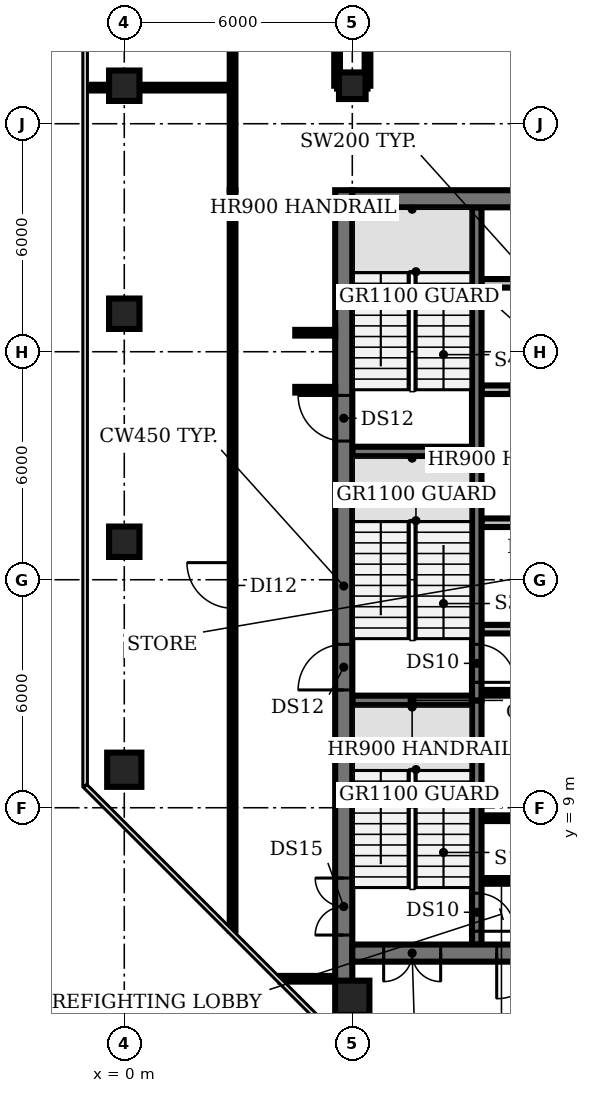
"""IFC4 building model, lengths in metres.
Left out: names, types, materials, properties, quantities, classifications, styles, units other than length and angle.
Written with IfcOpenShell. Run it as: python <this file> out.ifc"""

import sys

from ifc_helpers import new_model, si_unit, direction, frame, frame_2d, origin, origin_2d, place, context, subcontext, project, spatial, rectangle, circle, extrude, element, fill, save


model = new_model("IFC4")
c1 = context("Model", 3, precision=1e-05, world=origin(), true_north=direction((0.0, 1.0)))
c2 = subcontext(c1, "Body", "Model", "MODEL_VIEW")
j1 = project(units=[si_unit("LENGTHUNIT", "METRE"), si_unit("PLANEANGLEUNIT", "RADIAN")], contexts=[c1])
p1 = place(None, origin())
s1 = spatial("IfcSite", under=j1, at=p1, CompositionType="ELEMENT")
p2 = place(p1, origin())
s2 = spatial("IfcBuilding", under=s1, at=p2, CompositionType="ELEMENT")
p3 = place(p2, frame((0.0, 0.0, 226.4)))
s3 = spatial("IfcBuildingStorey", under=s2, at=p3, CompositionType="ELEMENT", Elevation=226.4)
p4 = place(p3, frame((0.0, 10.0, 0.0), z_axis=(0.0, 0.0, 1.0), x_axis=(1.0, 0.0, 0.0)))
e1 = element("IfcColumn", 1, at=p4, inside=s3, PredefinedType="COLUMN", context=c2, shape_type="SweptSolid", body=[
    extrude(circle(Radius=0.45, at=origin_2d()), origin(), (0.0, 0.0, 1.0), 3.85),
])
for number, where, z_axis, x_axis in (
    (2, (0.0, 16.0, 0.0), (0.0, 0.0, 1.0), (1.0, 0.0, 0.0)),
    (3, (0.0, 22.0, 0.0), (0.0, 0.0, 1.0), (1.0, 0.0, 0.0)),
    (4, (0.0, 28.0, 0.0), (0.0, 0.0, 1.0), (1.0, 0.0, 0.0)),
):
    element("IfcColumn", number, at=place(p3, frame(where, z_axis=z_axis, x_axis=x_axis)), inside=s3, PredefinedType="COLUMN", context=c2, shape_type="SweptSolid", body=[
        extrude(rectangle(XDim=0.8, YDim=0.8, at=origin_2d()), origin(), (0.0, 0.0, 1.0), 3.85),
    ])
p5 = place(p3, frame((6.0, 4.0, 0.0), z_axis=(0.0, 0.0, 1.0), x_axis=(1.0, 0.0, 0.0)))
e5 = element("IfcColumn", 5, at=p5, inside=s3, PredefinedType="COLUMN", context=c2, shape_type="SweptSolid", body=[
    extrude(circle(Radius=0.45, at=origin_2d()), origin(), (0.0, 0.0, 1.0), 3.85),
])
p6 = place(p3, frame((6.0, 28.0, 0.0), z_axis=(0.0, 0.0, 1.0), x_axis=(1.0, 0.0, 0.0)))
e6 = element("IfcColumn", 6, at=p6, inside=s3, PredefinedType="COLUMN", context=c2, shape_type="SweptSolid", body=[
    extrude(rectangle(XDim=0.7, YDim=0.7, at=origin_2d()), origin(), (0.0, 0.0, 1.0), 3.85),
])
for number, where, z_axis, x_axis in (
    (7, (9.4, 7.075, 0.0), (0.0, 0.0, 1.0), (1.0, 0.0, 0.0)),
    (8, (9.4, 8.725, 0.0), (0.0, 0.0, 1.0), (1.0, 0.0, 0.0)),
    (9, (9.4, 10.375, 0.0), (0.0, 0.0, 1.0), (1.0, 0.0, 0.0)),
):
    element("IfcWall", number, at=place(p3, frame(where, z_axis=z_axis, x_axis=x_axis)), inside=s3, PredefinedType="SHEAR", context=c2, shape_type="SweptSolid", body=[
        extrude(rectangle(XDim=1.05, YDim=0.15, at=frame_2d((0.525, 0.0))), origin(), (0.0, 0.0, 1.0), 3.85),
    ])
p7 = place(p3, frame((6.0, 11.825, 0.0), z_axis=(0.0, 0.0, 1.0), x_axis=(1.0, 0.0, 0.0)))
e10 = element("IfcWall", 10, at=p7, inside=s3, PredefinedType="SHEAR", context=c2, shape_type="SweptSolid", body=[
    extrude(rectangle(XDim=3.15, YDim=0.25, at=frame_2d((1.575, 0.0))), origin(), (0.0, 0.0, 1.0), 3.85),
])
p8 = place(p3, frame((9.4, 12.025, 0.0), z_axis=(0.0, 0.0, 1.0), x_axis=(1.0, 0.0, 0.0)))
e11 = element("IfcWall", 11, at=p8, inside=s3, PredefinedType="SHEAR", context=c2, shape_type="SweptSolid", body=[
    extrude(rectangle(XDim=1.05, YDim=0.15, at=frame_2d((0.525, 0.0))), origin(), (0.0, 0.0, 1.0), 3.85),
])
p9 = place(p3, frame((9.4, 13.7, 0.0), z_axis=(0.0, 0.0, 1.0), x_axis=(1.0, 0.0, 0.0)))
e12 = element("IfcWall", 12, at=p9, inside=s3, PredefinedType="PARTITIONING", context=c2, shape_type="SweptSolid", body=[
    extrude(rectangle(XDim=4.0, YDim=0.225, at=frame_2d((2.0, 0.0))), origin(), (0.0, 0.0, 1.0), 3.85),
])
p10 = place(p3, frame((9.4, 16.5, 0.0), z_axis=(0.0, 0.0, 1.0), x_axis=(1.0, 0.0, 0.0)))
e13 = element("IfcWall", 13, at=p10, inside=s3, PredefinedType="PARTITIONING", context=c2, shape_type="SweptSolid", body=[
    extrude(rectangle(XDim=14.6, YDim=0.225, at=frame_2d((7.3, 0.0))), origin(), (0.0, 0.0, 1.0), 3.85),
])
p11 = place(p10, frame((0.85, 0.0, 0.0)))
e14 = element("IfcOpeningElement", 14, at=p11, cuts=e13, PredefinedType="OPENING", context=c2, shape_type="SweptSolid", body=[
    extrude(rectangle(XDim=0.9, YDim=2.1, at=frame_2d((0.45, 1.05))), frame((0.0, 0.123, 0.0), z_axis=(0.0, -1.0, 0.0), x_axis=(1.0, 0.0, 0.0)), (0.0, 0.0, 1.0), 0.245),
])
p12 = place(p10, frame((3.625, 0.0, 0.0)))
e15 = element("IfcOpeningElement", 15, at=p12, cuts=e13, PredefinedType="OPENING", context=c2, shape_type="SweptSolid", body=[
    extrude(rectangle(XDim=0.9, YDim=2.1, at=frame_2d((0.45, 1.05))), frame((0.0, 0.123, 0.0), z_axis=(0.0, -1.0, 0.0), x_axis=(1.0, 0.0, 0.0)), (0.0, 0.0, 1.0), 0.245),
])
p13 = place(p10, frame((7.775, 0.0, 0.0)))
e16 = element("IfcOpeningElement", 16, at=p13, cuts=e13, PredefinedType="OPENING", context=c2, shape_type="SweptSolid", body=[
    extrude(rectangle(XDim=1.0, YDim=2.1, at=frame_2d((0.5, 1.05))), frame((0.0, 0.123, 0.0), z_axis=(0.0, -1.0, 0.0), x_axis=(1.0, 0.0, 0.0)), (0.0, 0.0, 1.0), 0.245),
])
p14 = place(p10, frame((12.4, 0.0, 0.0)))
e17 = element("IfcOpeningElement", 17, at=p14, cuts=e13, PredefinedType="OPENING", context=c2, shape_type="SweptSolid", body=[
    extrude(rectangle(XDim=1.0, YDim=2.1, at=frame_2d((0.5, 1.05))), frame((0.0, 0.123, 0.0), z_axis=(0.0, -1.0, 0.0), x_axis=(1.0, 0.0, 0.0)), (0.0, 0.0, 1.0), 0.245),
])
p15 = place(p3, frame((6.0, 18.375, 0.0), z_axis=(0.0, 0.0, 1.0), x_axis=(1.0, 0.0, 0.0)))
e18 = element("IfcWall", 18, at=p15, inside=s3, PredefinedType="SHEAR", context=c2, shape_type="SweptSolid", body=[
    extrude(rectangle(XDim=3.15, YDim=0.25, at=frame_2d((1.575, 0.0))), origin(), (0.0, 0.0, 1.0), 3.85),
])
p16 = place(p3, frame((24.0, 20.0, 0.0), z_axis=(0.0, 0.0, 1.0), x_axis=(-1.0, 0.0, 0.0)))
e19 = element("IfcWall", 19, at=p16, inside=s3, PredefinedType="PARTITIONING", context=c2, shape_type="SweptSolid", body=[
    extrude(rectangle(XDim=14.6, YDim=0.225, at=frame_2d((7.3, 0.0))), origin(), (0.0, 0.0, 1.0), 3.85),
])
p17 = place(p16, frame((12.75, 0.0, 0.0)))
e20 = element("IfcOpeningElement", 20, at=p17, cuts=e19, PredefinedType="OPENING", context=c2, shape_type="SweptSolid", body=[
    extrude(rectangle(XDim=1.1, YDim=2.1, at=frame_2d((0.55, 1.05))), frame((0.0, 0.123, 0.0), z_axis=(0.0, -1.0, 0.0), x_axis=(1.0, 0.0, 0.0)), (0.0, 0.0, 1.0), 0.245),
])
p18 = place(p16, frame((9.95, 0.0, 0.0)))
e21 = element("IfcOpeningElement", 21, at=p18, cuts=e19, PredefinedType="OPENING", context=c2, shape_type="SweptSolid", body=[
    extrude(rectangle(XDim=1.1, YDim=2.1, at=frame_2d((0.55, 1.05))), frame((0.0, 0.123, 0.0), z_axis=(0.0, -1.0, 0.0), x_axis=(1.0, 0.0, 0.0)), (0.0, 0.0, 1.0), 0.245),
])
p19 = place(p16, frame((7.15, 0.0, 0.0)))
e22 = element("IfcOpeningElement", 22, at=p19, cuts=e19, PredefinedType="OPENING", context=c2, shape_type="SweptSolid", body=[
    extrude(rectangle(XDim=1.1, YDim=2.1, at=frame_2d((0.55, 1.05))), frame((0.0, 0.123, 0.0), z_axis=(0.0, -1.0, 0.0), x_axis=(1.0, 0.0, 0.0)), (0.0, 0.0, 1.0), 0.245),
])
p20 = place(p16, frame((4.35, 0.0, 0.0)))
e23 = element("IfcOpeningElement", 23, at=p20, cuts=e19, PredefinedType="OPENING", context=c2, shape_type="SweptSolid", body=[
    extrude(rectangle(XDim=1.1, YDim=2.1, at=frame_2d((0.55, 1.05))), frame((0.0, 0.123, 0.0), z_axis=(0.0, -1.0, 0.0), x_axis=(1.0, 0.0, 0.0)), (0.0, 0.0, 1.0), 0.245),
])
p21 = place(p16, frame((1.2, 0.0, 0.0)))
e24 = element("IfcOpeningElement", 24, at=p21, cuts=e19, PredefinedType="OPENING", context=c2, shape_type="SweptSolid", body=[
    extrude(rectangle(XDim=1.0, YDim=2.1, at=frame_2d((0.5, 1.05))), frame((0.0, 0.123, 0.0), z_axis=(0.0, -1.0, 0.0), x_axis=(1.0, 0.0, 0.0)), (0.0, 0.0, 1.0), 0.245),
])
p22 = place(p3, frame((9.4, 22.8, 0.0), z_axis=(0.0, 0.0, 1.0), x_axis=(1.0, 0.0, 0.0)))
e25 = element("IfcWall", 25, at=p22, inside=s3, PredefinedType="PARTITIONING", context=c2, shape_type="SweptSolid", body=[
    extrude(rectangle(XDim=14.6, YDim=0.225, at=frame_2d((7.3, 0.0))), origin(), (0.0, 0.0, 1.0), 3.85),
])
p23 = place(p3, frame((9.275, 11.825, 0.0), z_axis=(0.0, 0.0, 1.0), x_axis=(0.0, -1.0, 0.0)))
e26 = element("IfcWall", 26, at=p23, inside=s3, PredefinedType="SHEAR", context=c2, shape_type="SweptSolid", body=[
    extrude(rectangle(XDim=6.425, YDim=0.25, at=frame_2d((3.212, 0.0))), origin(), (0.0, 0.0, 1.0), 3.85),
])
p24 = place(p23, frame((5.075, 0.0, 0.0)))
e27 = element("IfcOpeningElement", 27, at=p24, cuts=e26, PredefinedType="OPENING", context=c2, shape_type="SweptSolid", body=[
    extrude(rectangle(XDim=1.0, YDim=2.1, at=frame_2d((0.5, 1.05))), frame((0.0, 0.135, 0.0), z_axis=(0.0, -1.0, 0.0), x_axis=(1.0, 0.0, 0.0)), (0.0, 0.0, 1.0), 0.27),
])
p25 = place(p3, frame((9.275, 18.375, 0.0), z_axis=(0.0, 0.0, 1.0), x_axis=(0.0, -1.0, 0.0)))
e28 = element("IfcWall", 28, at=p25, inside=s3, PredefinedType="SHEAR", context=c2, shape_type="SweptSolid", body=[
    extrude(rectangle(XDim=6.55, YDim=0.25, at=frame_2d((3.275, 0.0))), origin(), (0.0, 0.0, 1.0), 3.85),
])
p26 = place(p25, frame((5.075, 0.0, 0.0)))
e29 = element("IfcOpeningElement", 29, at=p26, cuts=e28, PredefinedType="OPENING", context=c2, shape_type="SweptSolid", body=[
    extrude(rectangle(XDim=1.0, YDim=2.1, at=frame_2d((0.5, 1.05))), frame((0.0, 0.135, 0.0), z_axis=(0.0, -1.0, 0.0), x_axis=(1.0, 0.0, 0.0)), (0.0, 0.0, 1.0), 0.27),
])
p27 = place(p3, frame((9.275, 18.375, 0.0), z_axis=(0.0, 0.0, 1.0), x_axis=(0.0, 1.0, 0.0)))
e30 = element("IfcWall", 30, at=p27, inside=s3, PredefinedType="SHEAR", context=c2, shape_type="SweptSolid", body=[
    extrude(rectangle(XDim=6.425, YDim=0.25, at=frame_2d((3.212, 0.0))), origin(), (0.0, 0.0, 1.0), 3.85),
])
p28 = place(p3, frame((5.775, 4.42, 0.0), z_axis=(0.0, 0.0, 1.0), x_axis=(0.0, 1.0, 0.0)))
e31 = element("IfcWall", 31, at=p28, inside=s3, PredefinedType="SHEAR", context=c2, shape_type="SweptSolid", body=[
    extrude(rectangle(XDim=20.83, YDim=0.45, at=frame_2d((10.415, 0.0))), origin(), (0.0, 0.0, 1.0), 3.85),
])
p29 = place(p28, frame((1.23, 0.0, 0.0)))
e32 = element("IfcOpeningElement", 32, at=p29, cuts=e31, PredefinedType="OPENING", context=c2, shape_type="SweptSolid", body=[
    extrude(rectangle(XDim=1.5, YDim=2.1, at=frame_2d((0.75, 1.05))), frame((0.0, 0.235, 0.0), z_axis=(0.0, -1.0, 0.0), x_axis=(1.0, 0.0, 0.0)), (0.0, 0.0, 1.0), 0.47),
])
p30 = place(p28, frame((7.68, 0.0, 0.0)))
e33 = element("IfcOpeningElement", 33, at=p30, cuts=e31, PredefinedType="OPENING", context=c2, shape_type="SweptSolid", body=[
    extrude(rectangle(XDim=1.2, YDim=2.1, at=frame_2d((0.6, 1.05))), frame((0.0, 0.235, 0.0), z_axis=(0.0, -1.0, 0.0), x_axis=(1.0, 0.0, 0.0)), (0.0, 0.0, 1.0), 0.47),
])
p31 = place(p28, frame((14.23, 0.0, 0.0)))
e34 = element("IfcOpeningElement", 34, at=p31, cuts=e31, PredefinedType="OPENING", context=c2, shape_type="SweptSolid", body=[
    extrude(rectangle(XDim=1.2, YDim=2.1, at=frame_2d((0.6, 1.05))), frame((0.0, 0.235, 0.0), z_axis=(0.0, -1.0, 0.0), x_axis=(1.0, 0.0, 0.0)), (0.0, 0.0, 1.0), 0.47),
])
p32 = place(p3, frame((24.0, 5.175, 0.0), z_axis=(0.0, 0.0, 1.0), x_axis=(-1.0, 0.0, 0.0)))
e35 = element("IfcWall", 35, at=p32, inside=s3, PredefinedType="SHEAR", context=c2, shape_type="SweptSolid", body=[
    extrude(rectangle(XDim=18.0, YDim=0.45, at=frame_2d((9.0, 0.0))), origin(), (0.0, 0.0, 1.0), 3.85),
])
p33 = place(p32, frame((0.825, 0.0, 0.0)))
e36 = element("IfcOpeningElement", 36, at=p33, cuts=e35, PredefinedType="OPENING", context=c2, shape_type="SweptSolid", body=[
    extrude(rectangle(XDim=1.5, YDim=2.1, at=frame_2d((0.75, 1.05))), frame((0.0, 0.235, 0.0), z_axis=(0.0, -1.0, 0.0), x_axis=(1.0, 0.0, 0.0)), (0.0, 0.0, 1.0), 0.47),
])
p34 = place(p32, frame((15.675, 0.0, 0.0)))
e37 = element("IfcOpeningElement", 37, at=p34, cuts=e35, PredefinedType="OPENING", context=c2, shape_type="SweptSolid", body=[
    extrude(rectangle(XDim=1.5, YDim=2.1, at=frame_2d((0.75, 1.05))), frame((0.0, 0.235, 0.0), z_axis=(0.0, -1.0, 0.0), x_axis=(1.0, 0.0, 0.0)), (0.0, 0.0, 1.0), 0.47),
])
p35 = place(p32, frame((13.0, 0.0, 0.0)))
e38 = element("IfcOpeningElement", 38, at=p35, cuts=e35, PredefinedType="OPENING", context=c2, shape_type="SweptSolid", body=[
    extrude(rectangle(XDim=1.2, YDim=2.1, at=frame_2d((0.6, 1.05))), frame((0.0, 0.235, 0.0), z_axis=(0.0, -1.0, 0.0), x_axis=(1.0, 0.0, 0.0)), (0.0, 0.0, 1.0), 0.47),
])
p36 = place(p32, frame((4.4, 0.0, 0.0)))
e39 = element("IfcOpeningElement", 39, at=p36, cuts=e35, PredefinedType="OPENING", context=c2, shape_type="SweptSolid", body=[
    extrude(rectangle(XDim=1.0, YDim=2.1, at=frame_2d((0.5, 1.05))), frame((0.0, 0.235, 0.0), z_axis=(0.0, -1.0, 0.0), x_axis=(1.0, 0.0, 0.0)), (0.0, 0.0, 1.0), 0.47),
])
p37 = place(p3, frame((6.0, 25.025, 0.0), z_axis=(0.0, 0.0, 1.0), x_axis=(1.0, 0.0, 0.0)))
e40 = element("IfcWall", 40, at=p37, inside=s3, PredefinedType="SHEAR", context=c2, shape_type="SweptSolid", body=[
    extrude(rectangle(XDim=18.0, YDim=0.45, at=frame_2d((9.0, 0.0))), origin(), (0.0, 0.0, 1.0), 3.85),
])
p38 = place(p3, frame((-0.98, 27.95, 0.0), z_axis=(0.0, 0.0, 1.0), x_axis=(1.0, 0.0, 0.0)))
e41 = element("IfcWall", 41, at=p38, inside=s3, PredefinedType="PARTITIONING", context=c2, shape_type="SweptSolid", body=[
    extrude(rectangle(XDim=3.83, YDim=0.15, at=frame_2d((1.915, 0.0))), origin(), (0.0, 0.0, 1.0), 2.88),
])
p39 = place(p3, frame((2.85, 5.77, 0.0), z_axis=(0.0, 0.0, 1.0), x_axis=(0.0, 1.0, 0.0)))
e42 = element("IfcWall", 42, at=p39, inside=s3, PredefinedType="PARTITIONING", context=c2, shape_type="SweptSolid", body=[
    extrude(rectangle(XDim=19.48, YDim=0.15, at=frame_2d((9.74, 0.0))), origin(), (0.0, 0.0, 1.0), 2.88),
])
p40 = place(p39, frame((8.48, 0.0, 0.0)))
e43 = element("IfcOpeningElement", 43, at=p40, cuts=e42, PredefinedType="OPENING", context=c2, shape_type="SweptSolid", body=[
    extrude(rectangle(XDim=1.2, YDim=2.1, at=frame_2d((0.6, 1.05))), frame((0.0, 0.085, 0.0), z_axis=(0.0, -1.0, 0.0), x_axis=(1.0, 0.0, 0.0)), (0.0, 0.0, 1.0), 0.17),
])
p41 = place(p3, frame((2.85, 25.25, 0.0), z_axis=(0.0, 0.0, 1.0), x_axis=(0.0, 1.0, 0.0)))
e44 = element("IfcWall", 44, at=p41, inside=s3, PredefinedType="PARTITIONING", context=c2, shape_type="SweptSolid", body=[
    extrude(rectangle(XDim=3.9, YDim=0.15, at=frame_2d((1.95, 0.0))), origin(), (0.0, 0.0, 1.0), 2.88),
])
p42 = place(p3, frame((4.11, 4.5, 0.0), z_axis=(0.0, 0.0, 1.0), x_axis=(1.0, 0.0, 0.0)))
e45 = element("IfcWall", 45, at=p42, inside=s3, PredefinedType="PARTITIONING", context=c2, shape_type="SweptSolid", body=[
    extrude(rectangle(XDim=1.34, YDim=0.15, at=frame_2d((0.67, 0.0))), origin(), (0.0, 0.0, 1.0), 2.88),
])
for number, where, z_axis, x_axis in (
    (46, (4.5, 20.0, 0.0), (0.0, 0.0, 1.0), (1.0, 0.0, 0.0)),
    (47, (4.5, 21.5, 0.0), (0.0, 0.0, 1.0), (1.0, 0.0, 0.0)),
):
    element("IfcWall", number, at=place(p3, frame(where, z_axis=z_axis, x_axis=x_axis)), inside=s3, PredefinedType="PARTITIONING", context=c2, shape_type="SweptSolid", body=[
        extrude(rectangle(XDim=1.05, YDim=0.15, at=frame_2d((0.525, 0.0))), origin(), (0.0, 0.0, 1.0), 2.88),
    ])
p43 = place(p3, frame((5.6, 28.0, 0.0), z_axis=(0.0, 0.0, 1.0), x_axis=(0.0, 1.0, 0.0)))
e48 = element("IfcWall", 48, at=p43, inside=s3, PredefinedType="PARTITIONING", context=c2, shape_type="SweptSolid", body=[
    extrude(rectangle(XDim=1.15, YDim=0.15, at=frame_2d((0.575, 0.0))), origin(), (0.0, 0.0, 1.0), 2.88),
])
p44 = place(p3, frame((5.6, 28.0, 0.0), z_axis=(0.0, 0.0, 1.0), x_axis=(1.0, 0.0, 0.0)))
e49 = element("IfcWall", 49, at=p44, inside=s3, PredefinedType="PARTITIONING", context=c2, shape_type="SweptSolid", body=[
    extrude(rectangle(XDim=0.8, YDim=0.15, at=frame_2d((0.4, 0.0))), origin(), (0.0, 0.0, 1.0), 2.88),
])
p45 = place(p3, frame((6.4, 28.0, 0.0), z_axis=(0.0, 0.0, 1.0), x_axis=(0.0, 1.0, 0.0)))
e50 = element("IfcWall", 50, at=p45, inside=s3, PredefinedType="PARTITIONING", context=c2, shape_type="SweptSolid", body=[
    extrude(rectangle(XDim=1.15, YDim=0.15, at=frame_2d((0.575, 0.0))), origin(), (0.0, 0.0, 1.0), 2.88),
])
p46 = place(p24, origin())
e51 = element("IfcDoor", 51, at=p46, inside=s3, OperationType="SINGLE_SWING_RIGHT", PredefinedType="DOOR", context=c2, shape_type="SweptSolid", body=[
    extrude(rectangle(XDim=1.0, YDim=2.1, at=frame_2d((0.5, 1.05))), frame((0.0, 0.025, 0.0), z_axis=(0.0, -1.0, 0.0), x_axis=(1.0, 0.0, 0.0)), (0.0, 0.0, 1.0), 0.05),
])
fill(e27, e51)
p47 = place(p26, origin())
e52 = element("IfcDoor", 52, at=p47, inside=s3, OperationType="SINGLE_SWING_RIGHT", PredefinedType="DOOR", context=c2, shape_type="SweptSolid", body=[
    extrude(rectangle(XDim=1.0, YDim=2.1, at=frame_2d((0.5, 1.05))), frame((0.0, 0.025, 0.0), z_axis=(0.0, -1.0, 0.0), x_axis=(1.0, 0.0, 0.0)), (0.0, 0.0, 1.0), 0.05),
])
fill(e29, e52)
p48 = place(p29, origin())
e53 = element("IfcDoor", 53, at=p48, inside=s3, OperationType="DOUBLE_DOOR_SINGLE_SWING", PredefinedType="DOOR", context=c2, shape_type="SweptSolid", body=[
    extrude(rectangle(XDim=1.5, YDim=2.1, at=frame_2d((0.75, 1.05))), frame((0.0, 0.025, 0.0), z_axis=(0.0, -1.0, 0.0), x_axis=(1.0, 0.0, 0.0)), (0.0, 0.0, 1.0), 0.05),
])
fill(e32, e53)
p49 = place(p30, origin())
e54 = element("IfcDoor", 54, at=p49, inside=s3, OperationType="SINGLE_SWING_LEFT", PredefinedType="DOOR", context=c2, shape_type="SweptSolid", body=[
    extrude(rectangle(XDim=1.2, YDim=2.1, at=frame_2d((0.6, 1.05))), frame((0.0, 0.025, 0.0), z_axis=(0.0, -1.0, 0.0), x_axis=(1.0, 0.0, 0.0)), (0.0, 0.0, 1.0), 0.05),
])
fill(e33, e54)
p50 = place(p31, origin())
e55 = element("IfcDoor", 55, at=p50, inside=s3, OperationType="SINGLE_SWING_RIGHT", PredefinedType="DOOR", context=c2, shape_type="SweptSolid", body=[
    extrude(rectangle(XDim=1.2, YDim=2.1, at=frame_2d((0.6, 1.05))), frame((0.0, 0.025, 0.0), z_axis=(0.0, -1.0, 0.0), x_axis=(1.0, 0.0, 0.0)), (0.0, 0.0, 1.0), 0.05),
])
fill(e34, e55)
p51 = place(p34, origin())
e56 = element("IfcDoor", 56, at=p51, inside=s3, OperationType="DOUBLE_DOOR_SINGLE_SWING", PredefinedType="DOOR", context=c2, shape_type="SweptSolid", body=[
    extrude(rectangle(XDim=1.5, YDim=2.1, at=frame_2d((0.75, 1.05))), frame((0.0, 0.025, 0.0), z_axis=(0.0, -1.0, 0.0), x_axis=(1.0, 0.0, 0.0)), (0.0, 0.0, 1.0), 0.05),
])
fill(e37, e56)
p52 = place(p35, origin())
e57 = element("IfcDoor", 57, at=p52, inside=s3, OperationType="SINGLE_SWING_RIGHT", PredefinedType="DOOR", context=c2, shape_type="SweptSolid", body=[
    extrude(rectangle(XDim=1.2, YDim=2.1, at=frame_2d((0.6, 1.05))), frame((0.0, 0.025, 0.0), z_axis=(0.0, -1.0, 0.0), x_axis=(1.0, 0.0, 0.0)), (0.0, 0.0, 1.0), 0.05),
])
fill(e38, e57)
p53 = place(p40, origin())
e58 = element("IfcDoor", 58, at=p53, inside=s3, OperationType="SINGLE_SWING_RIGHT", PredefinedType="DOOR", context=c2, shape_type="SweptSolid", body=[
    extrude(rectangle(XDim=1.2, YDim=2.1, at=frame_2d((0.6, 1.05))), frame((0.0, 0.025, 0.0), z_axis=(0.0, -1.0, 0.0), x_axis=(1.0, 0.0, 0.0)), (0.0, 0.0, 1.0), 0.05),
])
fill(e43, e58)
save(model, sys.argv[1])
